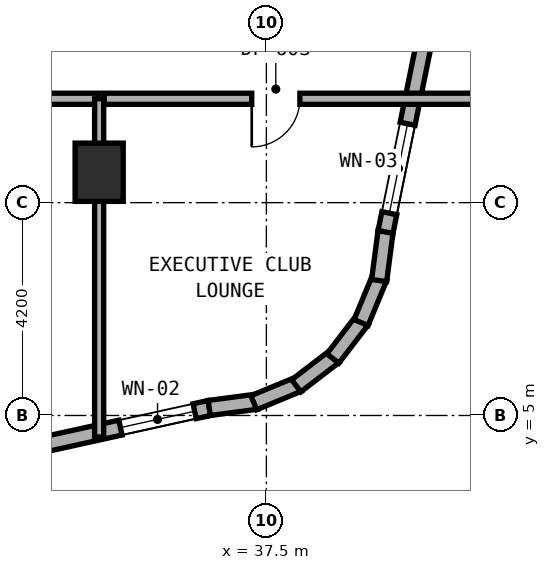
"""IFC4 building model, lengths in metres.
Left out: names, types, materials, properties, quantities, classifications, styles, units other than length and angle.
Written with IfcOpenShell. Run it as: python <this file> out.ifc"""

import sys

from ifc_helpers import new_model, si_unit, direction, frame, frame_2d, origin, origin_2d, place, context, subcontext, project, spatial, rectangle, extrude, element, fill, save


model = new_model("IFC4")
c1 = context("Model", 3, precision=1e-05, world=origin(), true_north=direction((0.0, 1.0)))
c2 = subcontext(c1, "Body", "Model", "MODEL_VIEW")
j1 = project(units=[si_unit("LENGTHUNIT", "METRE"), si_unit("PLANEANGLEUNIT", "RADIAN")], contexts=[c1])
p1 = place(None, origin())
s1 = spatial("IfcSite", under=j1, at=p1, CompositionType="ELEMENT")
p2 = place(p1, origin())
s2 = spatial("IfcBuilding", under=s1, at=p2, CompositionType="ELEMENT")
p3 = place(p2, frame((0.0, 0.0, 59.0)))
s3 = spatial("IfcBuildingStorey", under=s2, at=p3, CompositionType="ELEMENT", Elevation=59.0)
p4 = place(p3, frame((34.2, 9.8, 0.0), z_axis=(0.0, 0.0, 1.0), x_axis=(1.0, 0.0, 0.0)))
e1 = element("IfcColumn", 1, at=p4, inside=s3, PredefinedType="COLUMN", context=c2, shape_type="SweptSolid", body=[
    extrude(rectangle(XDim=0.95, YDim=1.15, at=origin_2d()), origin(), (0.0, 0.0, 1.0), 3.5),
])
p5 = place(p3, frame((27.272, 3.141, 0.0), z_axis=(0.0, 0.0, 1.0), x_axis=(0.976555357219, 0.21526642629, 0.0)))
e2 = element("IfcWall", 2, at=p5, inside=s3, PredefinedType="STANDARD", context=c2, shape_type="SweptSolid", body=[
    extrude(rectangle(XDim=9.323, YDim=0.3, at=frame_2d((4.661, 0.0))), origin(), (0.0, 0.0, 1.0), 3.22),
])
p6 = place(p5, frame((2.307, 0.0, 0.8)))
e3 = element("IfcOpeningElement", 3, at=p6, cuts=e2, PredefinedType="OPENING", context=c2, shape_type="SweptSolid", body=[
    extrude(rectangle(XDim=2.4, YDim=1.6, at=frame_2d((1.2, 0.8))), frame((0.0, 0.16, 0.0), z_axis=(0.0, -1.0, 0.0), x_axis=(1.0, 0.0, 0.0)), (0.0, 0.0, 1.0), 0.32),
])
p7 = place(p5, frame((7.524, 0.0, 0.85)))
e4 = element("IfcOpeningElement", 4, at=p7, cuts=e2, PredefinedType="OPENING", context=c2, shape_type="SweptSolid", body=[
    extrude(rectangle(XDim=1.5, YDim=1.5, at=frame_2d((0.75, 0.75))), frame((0.0, 0.16, 0.0), z_axis=(0.0, -1.0, 0.0), x_axis=(1.0, 0.0, 0.0)), (0.0, 0.0, 1.0), 0.32),
])
p8 = place(p3, frame((36.372, 5.148, 0.0), z_axis=(0.0, 0.0, 1.0), x_axis=(0.991359246108, 0.131174864804, 0.0)))
e5 = element("IfcWall", 5, at=p8, inside=s3, PredefinedType="STANDARD", context=c2, shape_type="SweptSolid", body=[
    extrude(rectangle(XDim=0.938, YDim=0.3, at=frame_2d((0.469, 0.0))), origin(), (0.0, 0.0, 1.0), 3.22),
])
p9 = place(p3, frame((37.252, 5.252, 0.0), z_axis=(0.0, 0.0, 1.0), x_axis=(0.924019948111, 0.382344263057, 0.0)))
e6 = element("IfcWall", 6, at=p9, inside=s3, PredefinedType="STANDARD", context=c2, shape_type="SweptSolid", body=[
    extrude(rectangle(XDim=0.955, YDim=0.3, at=frame_2d((0.477, 0.0))), origin(), (0.0, 0.0, 1.0), 3.22),
])
p10 = place(p3, frame((38.089, 5.586, 0.0), z_axis=(0.0, 0.0, 1.0), x_axis=(0.793573440799, 0.608474481025, 0.0)))
e7 = element("IfcWall", 7, at=p10, inside=s3, PredefinedType="STANDARD", context=c2, shape_type="SweptSolid", body=[
    extrude(rectangle(XDim=0.955, YDim=0.3, at=frame_2d((0.478, 0.0))), origin(), (0.0, 0.0, 1.0), 3.22),
])
p11 = place(p3, frame((38.812, 6.125, 0.0), z_axis=(0.0, 0.0, 1.0), x_axis=(0.608351047625, 0.793668068435, 0.0)))
e8 = element("IfcWall", 8, at=p11, inside=s3, PredefinedType="STANDARD", context=c2, shape_type="SweptSolid", body=[
    extrude(rectangle(XDim=0.955, YDim=0.3, at=frame_2d((0.478, 0.0))), origin(), (0.0, 0.0, 1.0), 3.22),
])
p12 = place(p3, frame((39.369, 6.834, 0.0), z_axis=(0.0, 0.0, 1.0), x_axis=(0.382344263057, 0.924019948111, 0.0)))
e9 = element("IfcWall", 9, at=p12, inside=s3, PredefinedType="STANDARD", context=c2, shape_type="SweptSolid", body=[
    extrude(rectangle(XDim=0.955, YDim=0.3, at=frame_2d((0.477, 0.0))), origin(), (0.0, 0.0, 1.0), 3.22),
])
p13 = place(p3, frame((39.725, 7.663, 0.0), z_axis=(0.0, 0.0, 1.0), x_axis=(0.130454512571, 0.991454295543, 0.0)))
e10 = element("IfcWall", 10, at=p13, inside=s3, PredefinedType="STANDARD", context=c2, shape_type="SweptSolid", body=[
    extrude(rectangle(XDim=0.973, YDim=0.3, at=frame_2d((0.487, 0.0))), origin(), (0.0, 0.0, 1.0), 3.22),
])
p14 = place(p3, frame((39.851, 8.622, 0.0), z_axis=(0.0, 0.0, 1.0), x_axis=(0.199990901713, 0.979797754249, 0.0)))
e11 = element("IfcWall", 11, at=p14, inside=s3, PredefinedType="STANDARD", context=c2, shape_type="SweptSolid", body=[
    extrude(rectangle(XDim=10.065, YDim=0.3, at=frame_2d((5.033, 0.0))), origin(), (0.0, 0.0, 1.0), 3.22),
])
p15 = place(p14, frame((0.378, 0.0, 0.85)))
e12 = element("IfcOpeningElement", 12, at=p15, cuts=e11, PredefinedType="OPENING", context=c2, shape_type="SweptSolid", body=[
    extrude(rectangle(XDim=1.8, YDim=1.5, at=frame_2d((0.9, 0.75))), frame((0.0, 0.16, 0.0), z_axis=(0.0, -1.0, 0.0), x_axis=(1.0, 0.0, 0.0)), (0.0, 0.0, 1.0), 0.32),
])
p16 = place(p14, frame((5.236, 0.0, 0.8)))
e13 = element("IfcOpeningElement", 13, at=p16, cuts=e11, PredefinedType="OPENING", context=c2, shape_type="SweptSolid", body=[
    extrude(rectangle(XDim=2.4, YDim=1.6, at=frame_2d((1.2, 0.8))), frame((0.0, 0.16, 0.0), z_axis=(0.0, -1.0, 0.0), x_axis=(1.0, 0.0, 0.0)), (0.0, 0.0, 1.0), 0.32),
])
p17 = place(p3, frame((28.0, 11.25, 0.0), z_axis=(0.0, 0.0, 1.0), x_axis=(1.0, 0.0, 0.0)))
e14 = element("IfcWall", 14, at=p17, inside=s3, PredefinedType="SOLIDWALL", context=c2, shape_type="SweptSolid", body=[
    extrude(rectangle(XDim=6.2, YDim=0.22, at=frame_2d((3.1, 0.0))), origin(), (0.0, 0.0, 1.0), 2.495),
])
p18 = place(p17, frame((2.625, 0.0, 0.0)))
e15 = element("IfcOpeningElement", 15, at=p18, cuts=e14, PredefinedType="OPENING", context=c2, shape_type="SweptSolid", body=[
    extrude(rectangle(XDim=0.95, YDim=2.1, at=frame_2d((0.475, 1.05))), frame((0.0, 0.12, 0.0), z_axis=(0.0, -1.0, 0.0), x_axis=(1.0, 0.0, 0.0)), (0.0, 0.0, 1.0), 0.24),
])
p19 = place(p3, frame((34.2, 4.576, 0.0), z_axis=(0.0, 0.0, 1.0), x_axis=(0.0, 1.0, 0.0)))
e16 = element("IfcWall", 16, at=p19, inside=s3, PredefinedType="SOLIDWALL", context=c2, shape_type="SweptSolid", body=[
    extrude(rectangle(XDim=6.674, YDim=0.18, at=frame_2d((3.337, 0.0))), origin(), (0.0, 0.0, 1.0), 2.495),
])
p20 = place(p3, frame((34.3, 11.25, 0.0), z_axis=(0.0, 0.0, 1.0), x_axis=(1.0, 0.0, 0.0)))
e17 = element("IfcWall", 17, at=p20, inside=s3, PredefinedType="SOLIDWALL", context=c2, shape_type="SweptSolid", body=[
    extrude(rectangle(XDim=7.44, YDim=0.22, at=frame_2d((3.72, 0.0))), origin(), (0.0, 0.0, 1.0), 2.745),
])
p21 = place(p20, frame((2.911, 0.0, 0.0)))
e18 = element("IfcOpeningElement", 18, at=p21, cuts=e17, PredefinedType="OPENING", context=c2, shape_type="SweptSolid", body=[
    extrude(rectangle(XDim=0.95, YDim=2.1, at=frame_2d((0.475, 1.05))), frame((0.0, 0.12, 0.0), z_axis=(0.0, -1.0, 0.0), x_axis=(1.0, 0.0, 0.0)), (0.0, 0.0, 1.0), 0.24),
])
p22 = place(p7, origin())
e19 = element("IfcWindow", 19, at=p22, inside=s3, PartitioningType="SINGLE_PANEL", PredefinedType="WINDOW", context=c2, shape_type="SweptSolid", body=[
    extrude(rectangle(XDim=1.5, YDim=1.5, at=frame_2d((0.75, 0.75))), frame((0.0, 0.03, 0.0), z_axis=(0.0, -1.0, 0.0), x_axis=(1.0, 0.0, 0.0)), (0.0, 0.0, 1.0), 0.06),
])
fill(e4, e19)
p23 = place(p15, origin())
e20 = element("IfcWindow", 20, at=p23, inside=s3, PartitioningType="SINGLE_PANEL", PredefinedType="WINDOW", context=c2, shape_type="SweptSolid", body=[
    extrude(rectangle(XDim=1.8, YDim=1.5, at=frame_2d((0.9, 0.75))), frame((0.0, 0.03, 0.0), z_axis=(0.0, -1.0, 0.0), x_axis=(1.0, 0.0, 0.0)), (0.0, 0.0, 1.0), 0.06),
])
fill(e12, e20)
p24 = place(p21, frame((0.95, 0.0, 0.0), z_axis=(0.0, 0.0, 1.0), x_axis=(-1.0, 0.0, 0.0)))
e21 = element("IfcDoor", 21, at=p24, inside=s3, OperationType="SINGLE_SWING_RIGHT", PredefinedType="DOOR", context=c2, shape_type="SweptSolid", body=[
    extrude(rectangle(XDim=0.95, YDim=2.1, at=frame_2d((0.475, 1.05))), frame((0.0, 0.025, 0.0), z_axis=(0.0, -1.0, 0.0), x_axis=(1.0, 0.0, 0.0)), (0.0, 0.0, 1.0), 0.05),
])
fill(e18, e21)
save(model, sys.argv[1])
